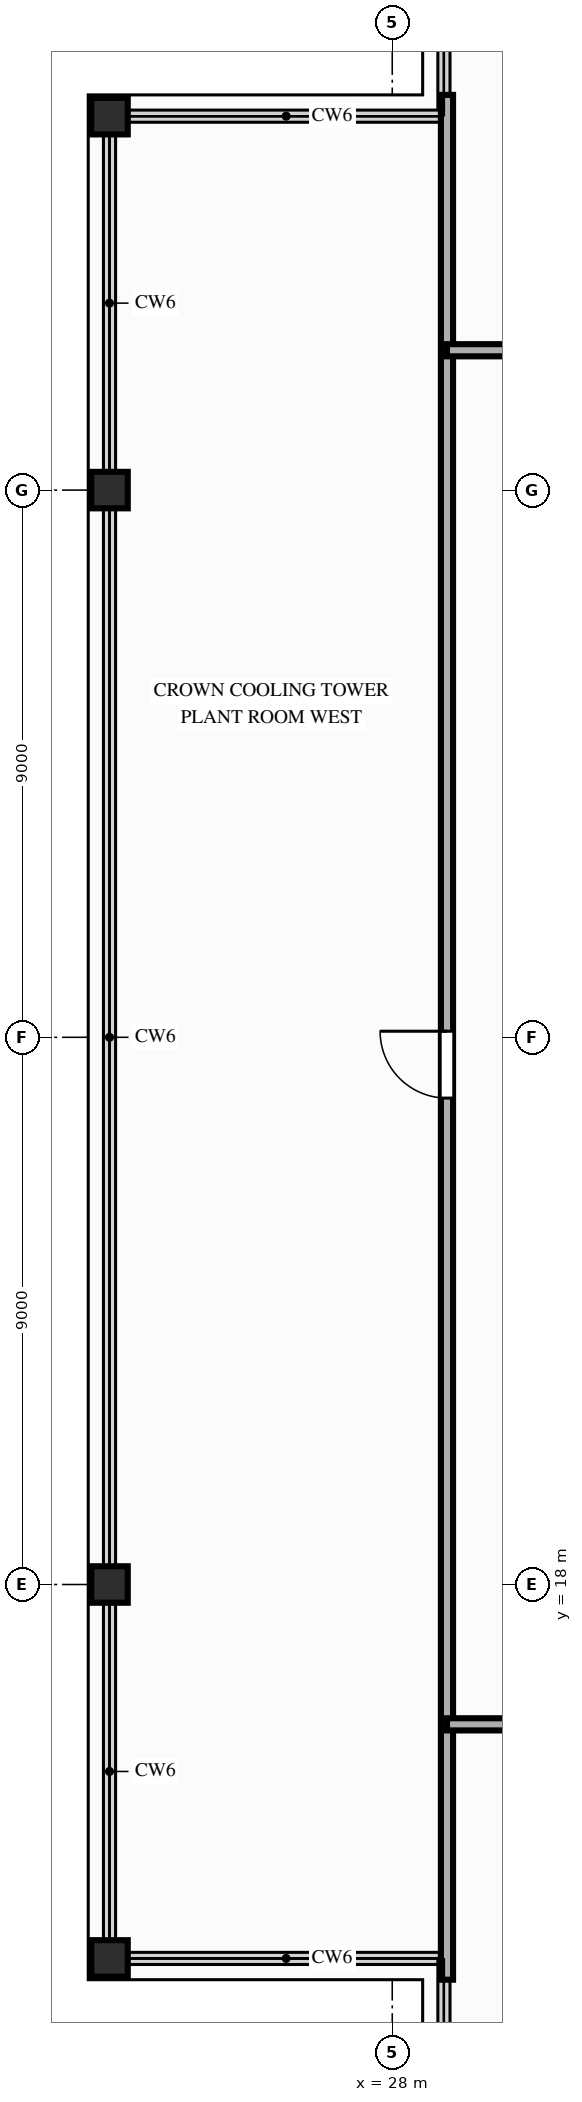
"""IFC4 building model, lengths in metres.
Left out: names, types, materials, properties, quantities, classifications, styles, units other than length and angle.
Written with IfcOpenShell. Run it as: python <this file> out.ifc"""

import sys

from ifc_helpers import new_model, si_unit, direction, frame, frame_2d, origin, origin_2d, place, context, subcontext, project, spatial, rectangle, extrude, source, transform, mapped, element, fill, save


model = new_model("IFC4")
c1 = context("Model", 3, precision=1e-05, world=origin(), true_north=direction((0.0, 1.0)))
c2 = subcontext(c1, "Body", "Model", "MODEL_VIEW")
j1 = project(units=[si_unit("LENGTHUNIT", "METRE"), si_unit("PLANEANGLEUNIT", "RADIAN")], contexts=[c1])
p1 = place(None, origin())
s1 = spatial("IfcSite", under=j1, at=p1, CompositionType="ELEMENT")
p2 = place(p1, origin())
s2 = spatial("IfcBuilding", under=s1, at=p2, CompositionType="ELEMENT")
p3 = place(p2, frame((0.0, 0.0, 252.2)))
s3 = spatial("IfcBuildingStorey", under=s2, at=p3, CompositionType="ELEMENT", Elevation=252.2)
m1 = source(origin(), c2, "Body", "SweptSolid", [
    extrude(rectangle(XDim=0.6, YDim=0.6, at=origin_2d()), origin(), (0.0, 0.0, 1.0), 3.8),
])
for number, where, z_axis, x_axis in (
    (1, (23.35, 42.15, 0.0), (0.0, 0.0, 1.0), (1.0, 0.0, 0.0)),
    (2, (23.35, 36.0, 0.0), (0.0, 0.0, 1.0), (1.0, 0.0, 0.0)),
    (3, (23.35, 18.0, 0.0), (0.0, 0.0, 1.0), (1.0, 0.0, 0.0)),
    (4, (23.35, 11.85, 0.0), (0.0, 0.0, 1.0), (1.0, 0.0, 0.0)),
):
    element("IfcColumn", number, at=place(p3, frame(where, z_axis=z_axis, x_axis=x_axis)), inside=s3, PredefinedType="COLUMN", context=c2, shape_type="MappedRepresentation", body=[
        mapped(m1, transform((0.0, 0.0, 0.0), scale=1.0)),
    ])
p4 = place(p3, frame((28.9, 11.5, 0.0), z_axis=(0.0, 0.0, 1.0), x_axis=(0.0, 1.0, 0.0)))
e5 = element("IfcWall", 5, at=p4, inside=s3, PredefinedType="PARTITIONING", context=c2, shape_type="SweptSolid", body=[
    extrude(rectangle(XDim=31.0, YDim=0.2, at=frame_2d((15.5, 0.0))), origin(), (0.0, 0.0, 1.0), 3.55),
])
p5 = place(p4, frame((14.5, 0.0, 0.0)))
e6 = element("IfcOpeningElement", 6, at=p5, cuts=e5, PredefinedType="OPENING", context=c2, shape_type="SweptSolid", body=[
    extrude(rectangle(XDim=1.1, YDim=2.15, at=frame_2d((0.55, 1.075))), frame((0.0, 0.112, 0.0), z_axis=(0.0, -1.0, 0.0), x_axis=(1.0, 0.0, 0.0)), (0.0, 0.0, 1.0), 0.224),
])
p6 = place(p3, frame((28.9, 15.7, 0.0), z_axis=(0.0, 0.0, 1.0), x_axis=(1.0, 0.0, 0.0)))
e7 = element("IfcWall", 7, at=p6, inside=s3, PredefinedType="PARTITIONING", context=c2, shape_type="SweptSolid", body=[
    extrude(rectangle(XDim=18.2, YDim=0.2, at=frame_2d((9.1, 0.0))), origin(), (0.0, 0.0, 1.0), 3.55),
])
p7 = place(p6, frame((8.5, 0.0, 0.0)))
e8 = element("IfcOpeningElement", 8, at=p7, cuts=e7, PredefinedType="OPENING", context=c2, shape_type="SweptSolid", body=[
    extrude(rectangle(XDim=1.1, YDim=2.15, at=frame_2d((0.55, 1.075))), frame((0.0, 0.112, 0.0), z_axis=(0.0, -1.0, 0.0), x_axis=(1.0, 0.0, 0.0)), (0.0, 0.0, 1.0), 0.224),
])
p8 = place(p3, frame((28.9, 38.3, 0.0), z_axis=(0.0, 0.0, 1.0), x_axis=(1.0, 0.0, 0.0)))
e9 = element("IfcWall", 9, at=p8, inside=s3, PredefinedType="PARTITIONING", context=c2, shape_type="SweptSolid", body=[
    extrude(rectangle(XDim=18.2, YDim=0.2, at=frame_2d((9.1, 0.0))), origin(), (0.0, 0.0, 1.0), 3.55),
])
p9 = place(p8, frame((8.5, 0.0, 0.0)))
e10 = element("IfcOpeningElement", 10, at=p9, cuts=e9, PredefinedType="OPENING", context=c2, shape_type="SweptSolid", body=[
    extrude(rectangle(XDim=1.1, YDim=2.15, at=frame_2d((0.55, 1.075))), frame((0.0, 0.112, 0.0), z_axis=(0.0, -1.0, 0.0), x_axis=(1.0, 0.0, 0.0)), (0.0, 0.0, 1.0), 0.224),
])
m2 = source(origin(), c2, "Body", "SweptSolid", [
    extrude(rectangle(XDim=1.1, YDim=2.15, at=frame_2d((0.55, 1.075))), frame((0.0, 0.025, 0.0), z_axis=(0.0, -1.0, 0.0), x_axis=(1.0, 0.0, 0.0)), (0.0, 0.0, 1.0), 0.05),
])
p10 = place(p5, origin())
e11 = element("IfcDoor", 11, at=p10, inside=s3, OperationType="SINGLE_SWING_RIGHT", PredefinedType="DOOR", context=c2, shape_type="MappedRepresentation", body=[
    mapped(m2, transform((0.0, 0.0, 0.0), scale=1.0)),
])
fill(e6, e11)
save(model, sys.argv[1])
